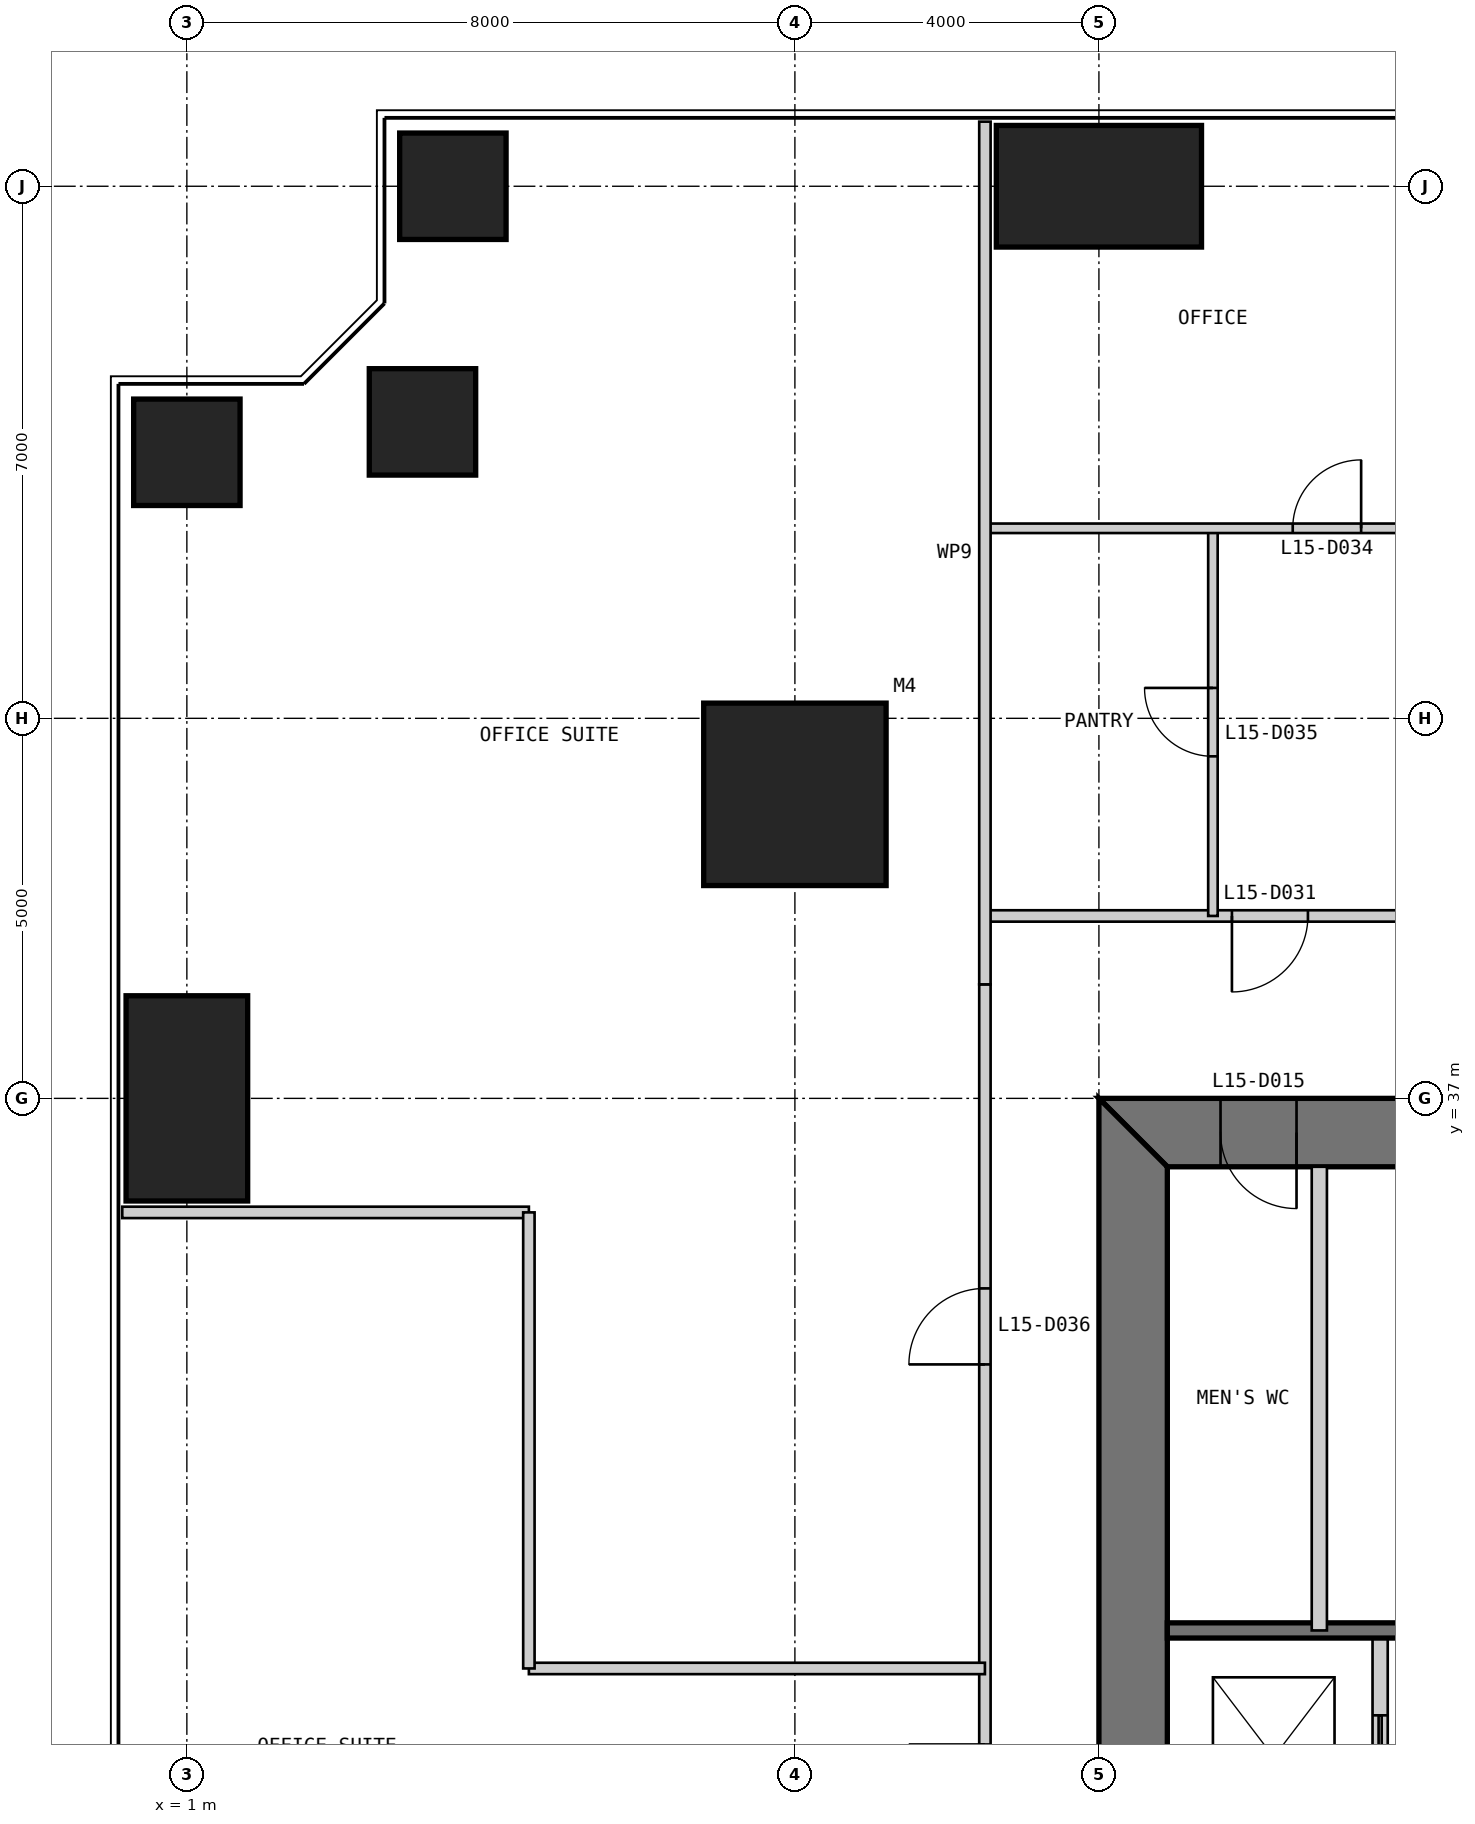
"""IFC4 building model, lengths in metres.
Left out: names, types, materials, properties, quantities, classifications, styles, units other than length and angle.
Written with IfcOpenShell. Run it as: python <this file> out.ifc"""

import sys

from ifc_helpers import new_model, si_unit, direction, frame, frame_2d, origin, origin_2d, place, context, subcontext, project, spatial, polyline, rectangle, outline, extrude, element, fill, save


model = new_model("IFC4")
c1 = context("Model", 3, precision=1e-05, world=origin(), true_north=direction((0.0, 1.0)))
c2 = subcontext(c1, "Body", "Model", "MODEL_VIEW")
j1 = project(units=[si_unit("LENGTHUNIT", "METRE"), si_unit("PLANEANGLEUNIT", "RADIAN")], contexts=[c1])
p1 = place(None, origin())
s1 = spatial("IfcSite", under=j1, at=p1, CompositionType="ELEMENT")
p2 = place(p1, origin())
s2 = spatial("IfcBuilding", under=s1, at=p2, CompositionType="ELEMENT")
p3 = place(p2, frame((0.0, 0.0, 67.0)))
s3 = spatial("IfcBuildingStorey", under=s2, at=p3, CompositionType="ELEMENT", Elevation=67.0)
p4 = place(p3, frame((9.0, 41.0, 0.0), z_axis=(0.0, 0.0, 1.0), x_axis=(1.0, 0.0, 0.0)))
e1 = element("IfcColumn", 1, at=p4, inside=s3, PredefinedType="COLUMN", context=c2, shape_type="SweptSolid", body=[
    extrude(rectangle(XDim=2.4, YDim=2.4, at=origin_2d()), origin(), (0.0, 0.0, 1.0), 4.0),
])
p5 = place(p3, frame((13.0, 49.0, 0.0), z_axis=(0.0, 0.0, 1.0), x_axis=(1.0, 0.0, 0.0)))
e2 = element("IfcColumn", 2, at=p5, inside=s3, PredefinedType="COLUMN", context=c2, shape_type="SweptSolid", body=[
    extrude(rectangle(XDim=2.7, YDim=1.6, at=origin_2d()), origin(), (0.0, 0.0, 1.0), 4.0),
])
for number, where, z_axis, x_axis in (
    (3, (4.5, 49.0, 0.0), (0.0, 0.0, 1.0), (1.0, 0.0, 0.0)),
    (4, (4.1, 45.9, 0.0), (0.0, 0.0, 1.0), (1.0, 0.0, 0.0)),
    (5, (1.0, 45.5, 0.0), (0.0, 0.0, 1.0), (1.0, 0.0, 0.0)),
):
    element("IfcColumn", number, at=place(p3, frame(where, z_axis=z_axis, x_axis=x_axis)), inside=s3, PredefinedType="COLUMN", context=c2, shape_type="SweptSolid", body=[
        extrude(rectangle(XDim=1.4, YDim=1.4, at=origin_2d()), origin(), (0.0, 0.0, 1.0), 4.0),
    ])
p6 = place(p3, frame((1.0, 37.0, 0.0), z_axis=(0.0, 0.0, 1.0), x_axis=(1.0, 0.0, 0.0)))
e6 = element("IfcColumn", 6, at=p6, inside=s3, PredefinedType="COLUMN", context=c2, shape_type="SweptSolid", body=[
    extrude(rectangle(XDim=1.6, YDim=2.7, at=origin_2d()), origin(), (0.0, 0.0, 1.0), 4.0),
])
p7 = place(p3, frame((37.0, 36.55, 0.0), z_axis=(0.0, 0.0, 1.0), x_axis=(-1.0, 0.0, 0.0)))
e7 = element("IfcWall", 7, at=p7, inside=s3, PredefinedType="SHEAR", context=c2, shape_type="SweptSolid", body=[
    extrude(outline(polyline([(0.0, -0.45), (24.0, -0.45), (23.1, 0.45), (0.9, 0.45), (0.0, -0.45)])), origin(), (0.0, 0.0, 1.0), 4.0),
])
p8 = place(p7, frame((4.9, 0.0, 0.0)))
e8 = element("IfcOpeningElement", 8, at=p8, cuts=e7, PredefinedType="OPENING", context=c2, shape_type="SweptSolid", body=[
    extrude(rectangle(XDim=1.0, YDim=2.2, at=frame_2d((0.5, 1.1))), frame((0.0, 0.46, 0.0), z_axis=(0.0, -1.0, 0.0), x_axis=(1.0, 0.0, 0.0)), (0.0, 0.0, 1.0), 0.92),
])
p9 = place(p7, frame((8.9, 0.0, 0.0)))
e9 = element("IfcOpeningElement", 9, at=p9, cuts=e7, PredefinedType="OPENING", context=c2, shape_type="SweptSolid", body=[
    extrude(rectangle(XDim=1.1, YDim=2.2, at=frame_2d((0.55, 1.1))), frame((0.0, 0.46, 0.0), z_axis=(0.0, -1.0, 0.0), x_axis=(1.0, 0.0, 0.0)), (0.0, 0.0, 1.0), 0.92),
])
p10 = place(p7, frame((15.05, 0.0, 0.0)))
e10 = element("IfcOpeningElement", 10, at=p10, cuts=e7, PredefinedType="OPENING", context=c2, shape_type="SweptSolid", body=[
    extrude(rectangle(XDim=0.9, YDim=2.2, at=frame_2d((0.45, 1.1))), frame((0.0, 0.46, 0.0), z_axis=(0.0, -1.0, 0.0), x_axis=(1.0, 0.0, 0.0)), (0.0, 0.0, 1.0), 0.92),
])
p11 = place(p7, frame((17.9, 0.0, 0.0)))
e11 = element("IfcOpeningElement", 11, at=p11, cuts=e7, PredefinedType="OPENING", context=c2, shape_type="SweptSolid", body=[
    extrude(rectangle(XDim=1.0, YDim=2.2, at=frame_2d((0.5, 1.1))), frame((0.0, 0.46, 0.0), z_axis=(0.0, -1.0, 0.0), x_axis=(1.0, 0.0, 0.0)), (0.0, 0.0, 1.0), 0.92),
])
p12 = place(p7, frame((21.4, 0.0, 0.0)))
e12 = element("IfcOpeningElement", 12, at=p12, cuts=e7, PredefinedType="OPENING", context=c2, shape_type="SweptSolid", body=[
    extrude(rectangle(XDim=1.0, YDim=2.2, at=frame_2d((0.5, 1.1))), frame((0.0, 0.46, 0.0), z_axis=(0.0, -1.0, 0.0), x_axis=(1.0, 0.0, 0.0)), (0.0, 0.0, 1.0), 0.92),
])
p13 = place(p3, frame((13.45, 36.1, 0.0), z_axis=(0.0, 0.0, 1.0), x_axis=(0.0, -1.0, 0.0)))
e13 = element("IfcWall", 13, at=p13, inside=s3, PredefinedType="SHEAR", context=c2, shape_type="SweptSolid", body=[
    extrude(outline(polyline([(-0.9, -0.45), (23.1, -0.45), (22.2, 0.45), (0.0, 0.45), (-0.9, -0.45)])), origin(), (0.0, 0.0, 1.0), 4.0),
])
p14 = place(p13, frame((20.2, 0.0, 0.0)))
e14 = element("IfcOpeningElement", 14, at=p14, cuts=e13, PredefinedType="OPENING", context=c2, shape_type="SweptSolid", body=[
    extrude(rectangle(XDim=1.0, YDim=2.2, at=frame_2d((0.5, 1.1))), frame((0.0, 0.46, 0.0), z_axis=(0.0, -1.0, 0.0), x_axis=(1.0, 0.0, 0.0)), (0.0, 0.0, 1.0), 0.92),
])
p15 = place(p13, frame((17.25, 0.0, 0.0)))
e15 = element("IfcOpeningElement", 15, at=p15, cuts=e13, PredefinedType="OPENING", context=c2, shape_type="SweptSolid", body=[
    extrude(rectangle(XDim=0.9, YDim=2.2, at=frame_2d((0.45, 1.1))), frame((0.0, 0.46, 0.0), z_axis=(0.0, -1.0, 0.0), x_axis=(1.0, 0.0, 0.0)), (0.0, 0.0, 1.0), 0.92),
])
p16 = place(p3, frame((16.7, 13.9, 0.0), z_axis=(0.0, 0.0, 1.0), x_axis=(0.0, 1.0, 0.0)))
e16 = element("IfcWall", 16, at=p16, inside=s3, PredefinedType="PARTITIONING", context=c2, shape_type="SweptSolid", body=[
    extrude(rectangle(XDim=16.1, YDim=0.2, at=frame_2d((8.05, 0.0))), origin(), (0.0, 0.0, 1.0), 3.8),
])
p17 = place(p16, frame((3.8, 0.0, 0.0)))
e17 = element("IfcOpeningElement", 17, at=p17, cuts=e16, PredefinedType="OPENING", context=c2, shape_type="SweptSolid", body=[
    extrude(rectangle(XDim=0.9, YDim=2.2, at=frame_2d((0.45, 1.1))), frame((0.0, 0.11, 0.0), z_axis=(0.0, -1.0, 0.0), x_axis=(1.0, 0.0, 0.0)), (0.0, 0.0, 1.0), 0.22),
])
p18 = place(p16, frame((7.217, 0.0, 0.0)))
e18 = element("IfcOpeningElement", 18, at=p18, cuts=e16, PredefinedType="OPENING", context=c2, shape_type="SweptSolid", body=[
    extrude(rectangle(XDim=1.1, YDim=2.2, at=frame_2d((0.55, 1.1))), frame((0.0, 0.11, 0.0), z_axis=(0.0, -1.0, 0.0), x_axis=(1.0, 0.0, 0.0)), (0.0, 0.0, 1.0), 0.22),
])
p19 = place(p16, frame((10.55, 0.0, 0.0)))
e19 = element("IfcOpeningElement", 19, at=p19, cuts=e16, PredefinedType="OPENING", context=c2, shape_type="SweptSolid", body=[
    extrude(rectangle(XDim=1.1, YDim=2.2, at=frame_2d((0.55, 1.1))), frame((0.0, 0.11, 0.0), z_axis=(0.0, -1.0, 0.0), x_axis=(1.0, 0.0, 0.0)), (0.0, 0.0, 1.0), 0.22),
])
p20 = place(p16, frame((13.883, 0.0, 0.0)))
e20 = element("IfcOpeningElement", 20, at=p20, cuts=e16, PredefinedType="OPENING", context=c2, shape_type="SweptSolid", body=[
    extrude(rectangle(XDim=1.1, YDim=2.2, at=frame_2d((0.55, 1.1))), frame((0.0, 0.11, 0.0), z_axis=(0.0, -1.0, 0.0), x_axis=(1.0, 0.0, 0.0)), (0.0, 0.0, 1.0), 0.22),
])
p21 = place(p3, frame((29.7, 30.0, 0.0), z_axis=(0.0, 0.0, 1.0), x_axis=(-1.0, 0.0, 0.0)))
e21 = element("IfcWall", 21, at=p21, inside=s3, PredefinedType="SOLIDWALL", context=c2, shape_type="SweptSolid", body=[
    extrude(rectangle(XDim=15.8, YDim=0.2, at=frame_2d((7.9, 0.0))), origin(), (0.0, 0.0, 1.0), 3.8),
])
p22 = place(p3, frame((15.9, 36.1, 0.0), z_axis=(0.0, 0.0, 1.0), x_axis=(0.0, -1.0, 0.0)))
e22 = element("IfcWall", 22, at=p22, inside=s3, PredefinedType="PARTITIONING", context=c2, shape_type="SweptSolid", body=[
    extrude(rectangle(XDim=6.1, YDim=0.2, at=frame_2d((3.05, 0.0))), origin(), (0.0, 0.0, 1.0), 3.8),
])
p23 = place(p3, frame((39.4, 39.4, 0.0), z_axis=(0.0, 0.0, 1.0), x_axis=(-1.0, 0.0, 0.0)))
e23 = element("IfcWall", 23, at=p23, inside=s3, PredefinedType="PARTITIONING", context=c2, shape_type="SweptSolid", body=[
    extrude(rectangle(XDim=27.9, YDim=0.15, at=frame_2d((13.95, 0.0))), origin(), (0.0, 0.0, 1.0), 3.85),
])
p24 = place(p23, frame((1.15, 0.0, 0.0)))
e24 = element("IfcOpeningElement", 24, at=p24, cuts=e23, PredefinedType="OPENING", context=c2, shape_type="SweptSolid", body=[
    extrude(rectangle(XDim=1.0, YDim=2.2, at=frame_2d((0.5, 1.1))), frame((0.0, 0.085, 0.0), z_axis=(0.0, -1.0, 0.0), x_axis=(1.0, 0.0, 0.0)), (0.0, 0.0, 1.0), 0.17),
])
p25 = place(p23, frame((23.65, 0.0, 0.0)))
e25 = element("IfcOpeningElement", 25, at=p25, cuts=e23, PredefinedType="OPENING", context=c2, shape_type="SweptSolid", body=[
    extrude(rectangle(XDim=1.0, YDim=2.2, at=frame_2d((0.5, 1.1))), frame((0.0, 0.085, 0.0), z_axis=(0.0, -1.0, 0.0), x_axis=(1.0, 0.0, 0.0)), (0.0, 0.0, 1.0), 0.17),
])
p26 = place(p3, frame((14.5, 44.5, 0.0), z_axis=(0.0, 0.0, 1.0), x_axis=(0.0, -1.0, 0.0)))
e26 = element("IfcWall", 26, at=p26, inside=s3, PredefinedType="PARTITIONING", context=c2, shape_type="SweptSolid", body=[
    extrude(rectangle(XDim=5.1, YDim=0.125, at=frame_2d((2.55, 0.0))), origin(), (0.0, 0.0, 1.0), 3.85),
])
p27 = place(p26, frame((2.1, 0.0, 0.0)))
e27 = element("IfcOpeningElement", 27, at=p27, cuts=e26, PredefinedType="OPENING", context=c2, shape_type="SweptSolid", body=[
    extrude(rectangle(XDim=0.9, YDim=2.2, at=frame_2d((0.45, 1.1))), frame((0.0, 0.073, 0.0), z_axis=(0.0, -1.0, 0.0), x_axis=(1.0, 0.0, 0.0)), (0.0, 0.0, 1.0), 0.145),
])
p28 = place(p3, frame((29.5, 44.5, 0.0), z_axis=(0.0, 0.0, 1.0), x_axis=(-1.0, 0.0, 0.0)))
e28 = element("IfcWall", 28, at=p28, inside=s3, PredefinedType="PARTITIONING", context=c2, shape_type="SweptSolid", body=[
    extrude(rectangle(XDim=18.0, YDim=0.125, at=frame_2d((9.0, 0.0))), origin(), (0.0, 0.0, 1.0), 3.85),
])
p29 = place(p28, frame((10.0, 0.0, 0.0)))
e29 = element("IfcOpeningElement", 29, at=p29, cuts=e28, PredefinedType="OPENING", context=c2, shape_type="SweptSolid", body=[
    extrude(rectangle(XDim=1.0, YDim=2.2, at=frame_2d((0.5, 1.1))), frame((0.0, 0.073, 0.0), z_axis=(0.0, -1.0, 0.0), x_axis=(1.0, 0.0, 0.0)), (0.0, 0.0, 1.0), 0.145),
])
p30 = place(p28, frame((13.05, 0.0, 0.0)))
e30 = element("IfcOpeningElement", 30, at=p30, cuts=e28, PredefinedType="OPENING", context=c2, shape_type="SweptSolid", body=[
    extrude(rectangle(XDim=0.9, YDim=2.2, at=frame_2d((0.45, 1.1))), frame((0.0, 0.073, 0.0), z_axis=(0.0, -1.0, 0.0), x_axis=(1.0, 0.0, 0.0)), (0.0, 0.0, 1.0), 0.145),
])
p31 = place(p3, frame((11.5, 38.5, 0.0), z_axis=(0.0, 0.0, 1.0), x_axis=(0.0, -1.0, 0.0)))
e31 = element("IfcWall", 31, at=p31, inside=s3, PredefinedType="PARTITIONING", context=c2, shape_type="SweptSolid", body=[
    extrude(rectangle(XDim=27.0, YDim=0.15, at=frame_2d((13.5, 0.0))), origin(), (0.0, 0.0, 1.0), 3.85),
])
p32 = place(p31, frame((4.0, 0.0, 0.0)))
e32 = element("IfcOpeningElement", 32, at=p32, cuts=e31, PredefinedType="OPENING", context=c2, shape_type="SweptSolid", body=[
    extrude(rectangle(XDim=1.0, YDim=2.2, at=frame_2d((0.5, 1.1))), frame((0.0, 0.085, 0.0), z_axis=(0.0, -1.0, 0.0), x_axis=(1.0, 0.0, 0.0)), (0.0, 0.0, 1.0), 0.17),
])
p33 = place(p31, frame((10.0, 0.0, 0.0)))
e33 = element("IfcOpeningElement", 33, at=p33, cuts=e31, PredefinedType="OPENING", context=c2, shape_type="SweptSolid", body=[
    extrude(rectangle(XDim=1.0, YDim=2.2, at=frame_2d((0.5, 1.1))), frame((0.0, 0.085, 0.0), z_axis=(0.0, -1.0, 0.0), x_axis=(1.0, 0.0, 0.0)), (0.0, 0.0, 1.0), 0.17),
])
p34 = place(p31, frame((17.5, 0.0, 0.0)))
e34 = element("IfcOpeningElement", 34, at=p34, cuts=e31, PredefinedType="OPENING", context=c2, shape_type="SweptSolid", body=[
    extrude(rectangle(XDim=1.0, YDim=2.2, at=frame_2d((0.5, 1.1))), frame((0.0, 0.085, 0.0), z_axis=(0.0, -1.0, 0.0), x_axis=(1.0, 0.0, 0.0)), (0.0, 0.0, 1.0), 0.17),
])
p35 = place(p31, frame((23.5, 0.0, 0.0)))
e35 = element("IfcOpeningElement", 35, at=p35, cuts=e31, PredefinedType="OPENING", context=c2, shape_type="SweptSolid", body=[
    extrude(rectangle(XDim=1.0, YDim=2.2, at=frame_2d((0.5, 1.1))), frame((0.0, 0.085, 0.0), z_axis=(0.0, -1.0, 0.0), x_axis=(1.0, 0.0, 0.0)), (0.0, 0.0, 1.0), 0.17),
])
p36 = place(p3, frame((11.5, 49.85, 0.0), z_axis=(0.0, 0.0, 1.0), x_axis=(0.0, -1.0, 0.0)))
e36 = element("IfcWall", 36, at=p36, inside=s3, PredefinedType="PARTITIONING", context=c2, shape_type="SweptSolid", body=[
    extrude(rectangle(XDim=11.35, YDim=0.15, at=frame_2d((5.675, 0.0))), origin(), (0.0, 0.0, 1.0), 3.85),
])
p37 = place(p3, frame((0.15, 35.5, 0.0), z_axis=(0.0, 0.0, 1.0), x_axis=(1.0, 0.0, 0.0)))
e37 = element("IfcWall", 37, at=p37, inside=s3, PredefinedType="PARTITIONING", context=c2, shape_type="SweptSolid", body=[
    extrude(rectangle(XDim=5.35, YDim=0.15, at=frame_2d((2.675, 0.0))), origin(), (0.0, 0.0, 1.0), 3.85),
])
for number, where, z_axis, x_axis in (
    (38, (5.5, 29.5, 0.0), (0.0, 0.0, 1.0), (1.0, 0.0, 0.0)),
    (39, (5.5, 35.5, 0.0), (0.0, 0.0, 1.0), (0.0, -1.0, 0.0)),
):
    element("IfcWall", number, at=place(p3, frame(where, z_axis=z_axis, x_axis=x_axis)), inside=s3, PredefinedType="PARTITIONING", context=c2, shape_type="SweptSolid", body=[
        extrude(rectangle(XDim=6.0, YDim=0.15, at=frame_2d((3.0, 0.0))), origin(), (0.0, 0.0, 1.0), 3.85),
    ])
p38 = place(p12, origin())
e40 = element("IfcDoor", 40, at=p38, inside=s3, OperationType="SINGLE_SWING_LEFT", PredefinedType="DOOR", context=c2, shape_type="SweptSolid", body=[
    extrude(rectangle(XDim=1.0, YDim=2.2, at=frame_2d((0.5, 1.1))), frame((0.0, 0.025, 0.0), z_axis=(0.0, -1.0, 0.0), x_axis=(1.0, 0.0, 0.0)), (0.0, 0.0, 1.0), 0.05),
    extrude(outline(polyline([(0.0, 0.0), (0.04, 0.0), (0.04, 2.16), (0.96, 2.16), (0.96, 0.0), (1.0, 0.0), (1.0, 2.2), (0.0, 2.2), (0.0, 0.0)])), frame((0.0, 0.3, 0.0), z_axis=(0.0, -1.0, 0.0), x_axis=(1.0, 0.0, 0.0)), (0.0, 0.0, 1.0), 0.6),
])
fill(e12, e40)
p39 = place(p25, origin())
e41 = element("IfcDoor", 41, at=p39, inside=s3, OperationType="SINGLE_SWING_RIGHT", PredefinedType="DOOR", context=c2, shape_type="SweptSolid", body=[
    extrude(rectangle(XDim=1.0, YDim=2.2, at=frame_2d((0.5, 1.1))), frame((0.0, 0.025, 0.0), z_axis=(0.0, -1.0, 0.0), x_axis=(1.0, 0.0, 0.0)), (0.0, 0.0, 1.0), 0.05),
])
fill(e25, e41)
p40 = place(p30, frame((0.9, 0.0, 0.0), z_axis=(0.0, 0.0, 1.0), x_axis=(-1.0, 0.0, 0.0)))
e42 = element("IfcDoor", 42, at=p40, inside=s3, OperationType="SINGLE_SWING_RIGHT", PredefinedType="DOOR", context=c2, shape_type="SweptSolid", body=[
    extrude(rectangle(XDim=0.9, YDim=2.2, at=frame_2d((0.45, 1.1))), frame((0.0, 0.025, 0.0), z_axis=(0.0, -1.0, 0.0), x_axis=(1.0, 0.0, 0.0)), (0.0, 0.0, 1.0), 0.05),
])
fill(e30, e42)
p41 = place(p27, frame((0.9, 0.0, 0.0), z_axis=(0.0, 0.0, 1.0), x_axis=(-1.0, 0.0, 0.0)))
e43 = element("IfcDoor", 43, at=p41, inside=s3, OperationType="SINGLE_SWING_RIGHT", PredefinedType="DOOR", context=c2, shape_type="SweptSolid", body=[
    extrude(rectangle(XDim=0.9, YDim=2.2, at=frame_2d((0.45, 1.1))), frame((0.0, 0.025, 0.0), z_axis=(0.0, -1.0, 0.0), x_axis=(1.0, 0.0, 0.0)), (0.0, 0.0, 1.0), 0.05),
])
fill(e27, e43)
p42 = place(p32, frame((1.0, 0.0, 0.0), z_axis=(0.0, 0.0, 1.0), x_axis=(-1.0, 0.0, 0.0)))
e44 = element("IfcDoor", 44, at=p42, inside=s3, OperationType="SINGLE_SWING_LEFT", PredefinedType="DOOR", context=c2, shape_type="SweptSolid", body=[
    extrude(rectangle(XDim=1.0, YDim=2.2, at=frame_2d((0.5, 1.1))), frame((0.0, 0.025, 0.0), z_axis=(0.0, -1.0, 0.0), x_axis=(1.0, 0.0, 0.0)), (0.0, 0.0, 1.0), 0.05),
])
fill(e32, e44)
p43 = place(p20, origin())
e45 = element("IfcDoor", 45, at=p43, inside=s3, OperationType="DOUBLE_DOOR_SLIDING", PredefinedType="DOOR", context=c2, shape_type="SweptSolid", body=[
    extrude(rectangle(XDim=1.1, YDim=2.2, at=frame_2d((0.55, 1.1))), frame((0.0, 0.025, 0.0), z_axis=(0.0, -1.0, 0.0), x_axis=(1.0, 0.0, 0.0)), (0.0, 0.0, 1.0), 0.05),
])
fill(e20, e45)
save(model, sys.argv[1])
